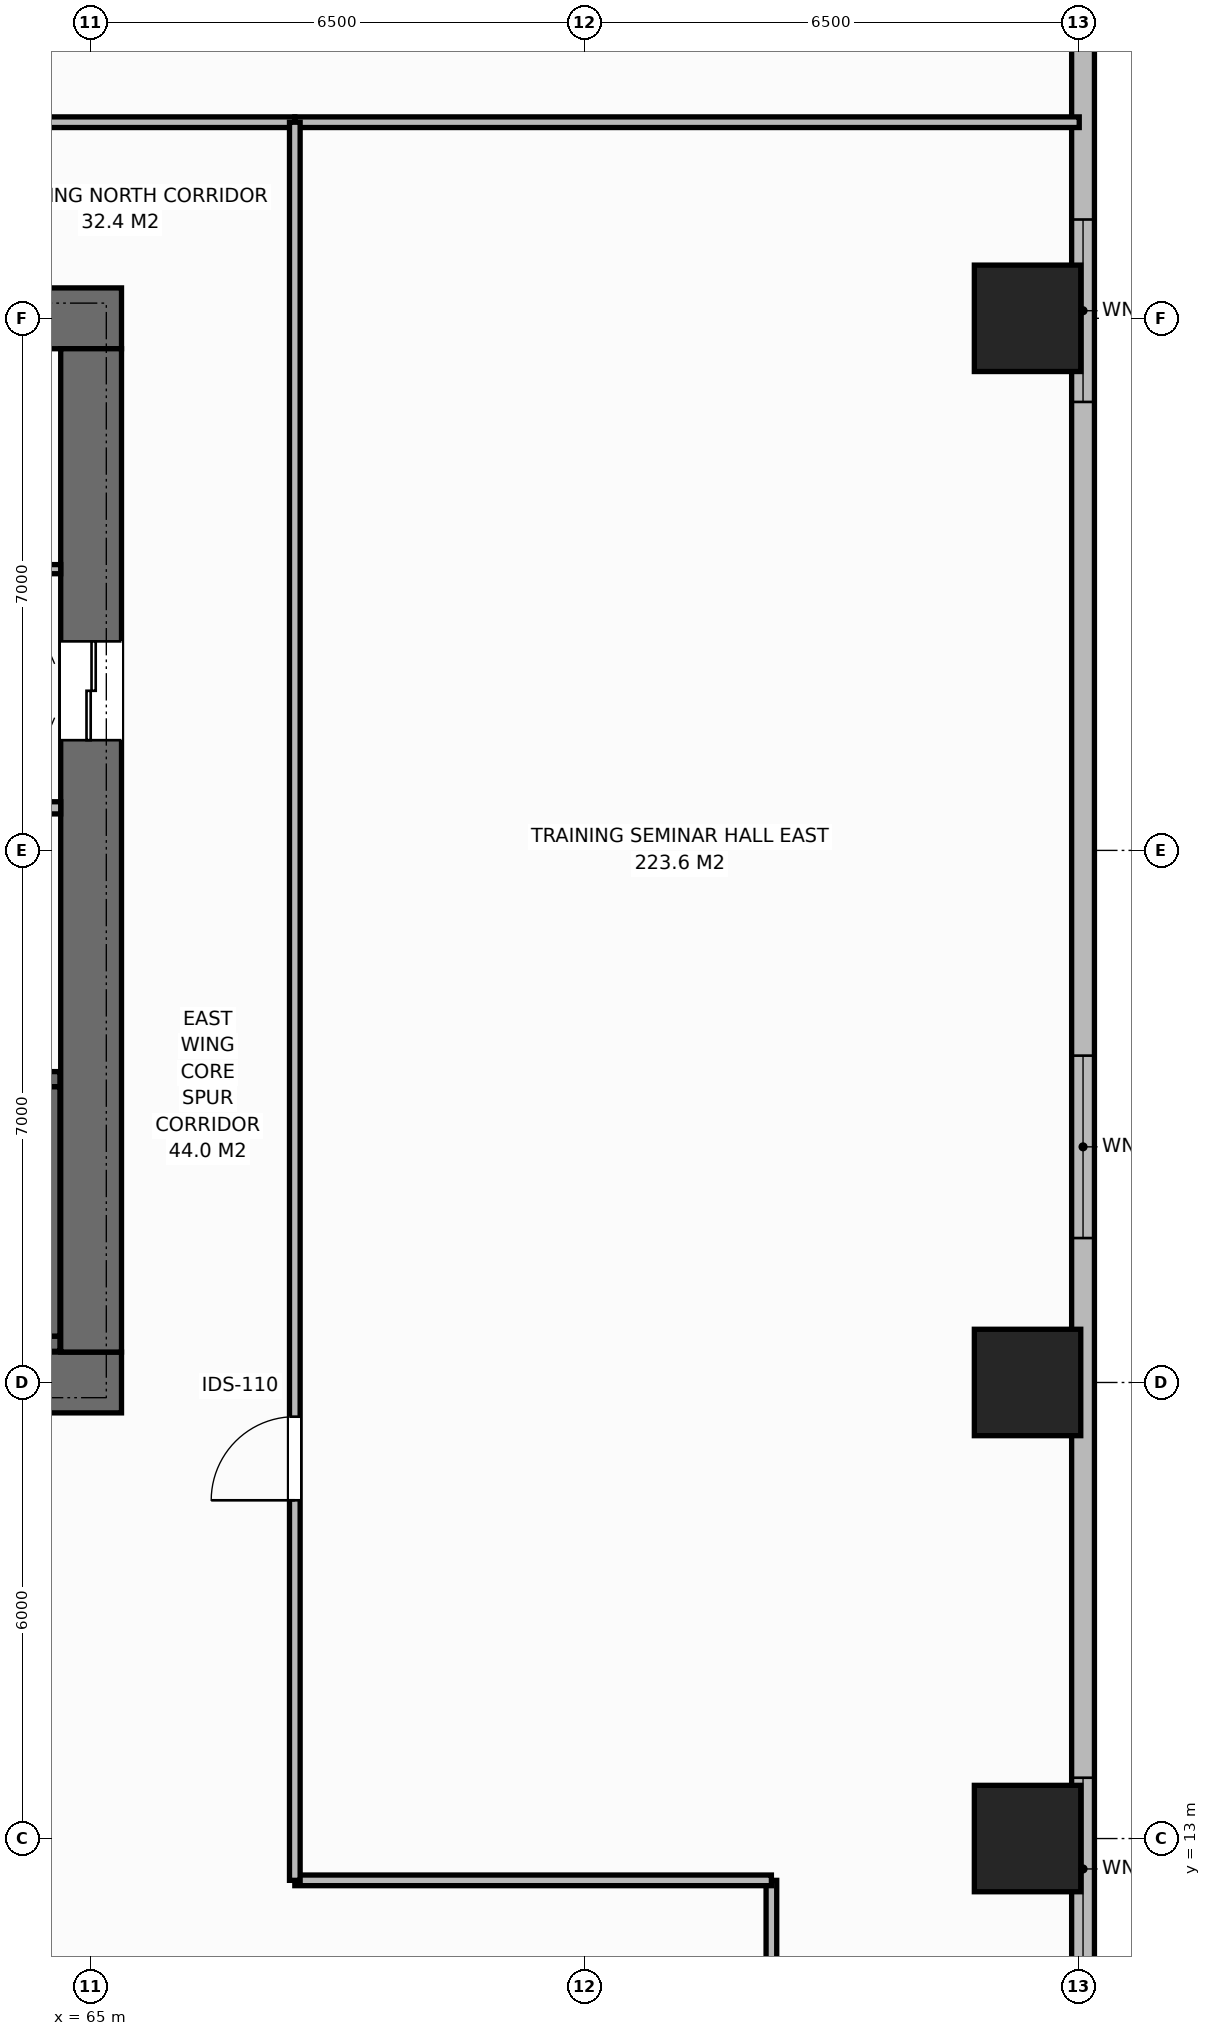
"""IFC4 building model, lengths in metres.
Left out: names, types, materials, properties, quantities, classifications, styles, units other than length and angle.
Written with IfcOpenShell. Run it as: python <this file> out.ifc"""

import sys

from ifc_helpers import new_model, si_unit, direction, frame, frame_2d, origin, origin_2d, place, context, subcontext, project, spatial, rectangle, extrude, element, fill, save


model = new_model("IFC4")
c1 = context("Model", 3, precision=1e-05, world=origin(), true_north=direction((0.0, 1.0)))
c2 = subcontext(c1, "Body", "Model", "MODEL_VIEW")
j1 = project(units=[si_unit("LENGTHUNIT", "METRE"), si_unit("PLANEANGLEUNIT", "RADIAN")], contexts=[c1])
p1 = place(None, origin())
s1 = spatial("IfcSite", under=j1, at=p1, CompositionType="ELEMENT")
p2 = place(p1, origin())
s2 = spatial("IfcBuilding", under=s1, at=p2, CompositionType="ELEMENT")
p3 = place(p2, frame((0.0, 0.0, 11.5)))
s3 = spatial("IfcBuildingStorey", under=s2, at=p3, CompositionType="ELEMENT", Elevation=11.5)
p4 = place(p3, frame((51.6, 19.0, 0.0), z_axis=(0.0, 0.0, 1.0), x_axis=(1.0, 0.0, 0.0)))
e1 = element("IfcWall", 1, at=p4, inside=s3, PredefinedType="SHEAR", context=c2, shape_type="SweptSolid", body=[
    extrude(rectangle(XDim=13.8, YDim=0.8, at=frame_2d((6.9, 0.0))), origin(), (0.0, 0.0, 1.0), 5.5),
])
p5 = place(p4, frame((3.12, 0.0, 0.0)))
e2 = element("IfcOpeningElement", 2, at=p5, cuts=e1, PredefinedType="OPENING", context=c2, shape_type="SweptSolid", body=[
    extrude(rectangle(XDim=1.4, YDim=2.2, at=frame_2d((0.7, 1.1))), frame((0.0, 0.41, 0.0), z_axis=(0.0, -1.0, 0.0), x_axis=(1.0, 0.0, 0.0)), (0.0, 0.0, 1.0), 0.82),
])
p6 = place(p3, frame((51.6, 33.0, 0.0), z_axis=(0.0, 0.0, 1.0), x_axis=(1.0, 0.0, 0.0)))
e3 = element("IfcWall", 3, at=p6, inside=s3, PredefinedType="SHEAR", context=c2, shape_type="SweptSolid", body=[
    extrude(rectangle(XDim=13.8, YDim=0.8, at=frame_2d((6.9, 0.0))), origin(), (0.0, 0.0, 1.0), 5.5),
])
p7 = place(p6, frame((3.12, 0.0, 0.0)))
e4 = element("IfcOpeningElement", 4, at=p7, cuts=e3, PredefinedType="OPENING", context=c2, shape_type="SweptSolid", body=[
    extrude(rectangle(XDim=1.4, YDim=2.2, at=frame_2d((0.7, 1.1))), frame((0.0, 0.41, 0.0), z_axis=(0.0, -1.0, 0.0), x_axis=(1.0, 0.0, 0.0)), (0.0, 0.0, 1.0), 0.82),
])
p8 = place(p6, frame((11.0, 0.0, 0.0)))
e5 = element("IfcOpeningElement", 5, at=p8, cuts=e3, PredefinedType="OPENING", context=c2, shape_type="SweptSolid", body=[
    extrude(rectangle(XDim=0.9, YDim=2.15, at=frame_2d((0.45, 1.075))), frame((0.0, 0.41, 0.0), z_axis=(0.0, -1.0, 0.0), x_axis=(1.0, 0.0, 0.0)), (0.0, 0.0, 1.0), 0.82),
])
p9 = place(p6, frame((5.75, 0.0, 0.0)))
e6 = element("IfcOpeningElement", 6, at=p9, cuts=e3, PredefinedType="OPENING", context=c2, shape_type="SweptSolid", body=[
    extrude(rectangle(XDim=0.9, YDim=2.15, at=frame_2d((0.45, 1.075))), frame((0.0, 0.41, 0.0), z_axis=(0.0, -1.0, 0.0), x_axis=(1.0, 0.0, 0.0)), (0.0, 0.0, 1.0), 0.82),
])
p10 = place(p6, frame((7.35, 0.0, 0.0)))
e7 = element("IfcOpeningElement", 7, at=p10, cuts=e3, PredefinedType="OPENING", context=c2, shape_type="SweptSolid", body=[
    extrude(rectangle(XDim=0.9, YDim=2.15, at=frame_2d((0.45, 1.075))), frame((0.0, 0.41, 0.0), z_axis=(0.0, -1.0, 0.0), x_axis=(1.0, 0.0, 0.0)), (0.0, 0.0, 1.0), 0.82),
])
p11 = place(p6, frame((8.95, 0.0, 0.0)))
e8 = element("IfcOpeningElement", 8, at=p11, cuts=e3, PredefinedType="OPENING", context=c2, shape_type="SweptSolid", body=[
    extrude(rectangle(XDim=0.9, YDim=2.15, at=frame_2d((0.45, 1.075))), frame((0.0, 0.41, 0.0), z_axis=(0.0, -1.0, 0.0), x_axis=(1.0, 0.0, 0.0)), (0.0, 0.0, 1.0), 0.82),
])
p12 = place(p3, frame((65.0, 19.4, 0.0), z_axis=(0.0, 0.0, 1.0), x_axis=(0.0, 1.0, 0.0)))
e9 = element("IfcWall", 9, at=p12, inside=s3, PredefinedType="SHEAR", context=c2, shape_type="SweptSolid", body=[
    extrude(rectangle(XDim=13.2, YDim=0.8, at=frame_2d((6.6, 0.0))), origin(), (0.0, 0.0, 1.0), 5.5),
])
p13 = place(p12, frame((8.05, 0.0, 0.0)))
e10 = element("IfcOpeningElement", 10, at=p13, cuts=e9, PredefinedType="OPENING", context=c2, shape_type="SweptSolid", body=[
    extrude(rectangle(XDim=1.3, YDim=2.2, at=frame_2d((0.65, 1.1))), frame((0.0, 0.41, 0.0), z_axis=(0.0, -1.0, 0.0), x_axis=(1.0, 0.0, 0.0)), (0.0, 0.0, 1.0), 0.82),
])
p14 = place(p3, frame((56.16, 19.51, 0.0), z_axis=(0.0, 0.0, 1.0), x_axis=(1.0, 0.0, 0.0)))
e11 = element("IfcWall", 11, at=p14, inside=s3, PredefinedType="SHEAR", context=c2, shape_type="SweptSolid", body=[
    extrude(rectangle(XDim=8.43, YDim=0.2, at=frame_2d((4.215, 0.0))), origin(), (0.0, 0.0, 1.0), 5.5),
])
p15 = place(p3, frame((56.16, 22.99, 0.0), z_axis=(0.0, 0.0, 1.0), x_axis=(1.0, 0.0, 0.0)))
e12 = element("IfcWall", 12, at=p15, inside=s3, PredefinedType="SHEAR", context=c2, shape_type="SweptSolid", body=[
    extrude(rectangle(XDim=8.43, YDim=0.2, at=frame_2d((4.215, 0.0))), origin(), (0.0, 0.0, 1.0), 5.5),
])
p16 = place(p15, frame((0.45, 0.0, 0.0)))
e13 = element("IfcOpeningElement", 13, at=p16, cuts=e12, PredefinedType="OPENING", context=c2, shape_type="SweptSolid", body=[
    extrude(rectangle(XDim=1.0, YDim=2.15, at=frame_2d((0.5, 1.075))), frame((0.0, 0.11, 0.0), z_axis=(0.0, -1.0, 0.0), x_axis=(1.0, 0.0, 0.0)), (0.0, 0.0, 1.0), 0.22),
])
p17 = place(p3, frame((64.49, 19.61, 0.0), z_axis=(0.0, 0.0, 1.0), x_axis=(0.0, 1.0, 0.0)))
e14 = element("IfcWall", 14, at=p17, inside=s3, PredefinedType="SHEAR", context=c2, shape_type="SweptSolid", body=[
    extrude(rectangle(XDim=3.28, YDim=0.2, at=frame_2d((1.64, 0.0))), origin(), (0.0, 0.0, 1.0), 5.5),
])
for number, where, z_axis, x_axis in (
    (15, (77.32, 13.0, 0.0), (0.0, 0.0, 1.0), (1.0, 0.0, 0.0)),
    (16, (77.32, 19.0, 0.0), (0.0, 0.0, 1.0), (1.0, 0.0, 0.0)),
    (17, (77.32, 33.0, 0.0), (0.0, 0.0, 1.0), (1.0, 0.0, 0.0)),
):
    element("IfcColumn", number, at=place(p3, frame(where, z_axis=z_axis, x_axis=x_axis)), inside=s3, PredefinedType="COLUMN", context=c2, shape_type="SweptSolid", body=[
        extrude(rectangle(XDim=1.4, YDim=1.4, at=origin_2d()), origin(), (0.0, 0.0, 1.0), 5.5),
    ])
p18 = place(p3, frame((78.05, 48.8, 0.0), z_axis=(0.0, 0.0, 1.0), x_axis=(0.0, -1.0, 0.0)))
e18 = element("IfcWall", 18, at=p18, inside=s3, PredefinedType="STANDARD", context=c2, shape_type="SweptSolid", body=[
    extrude(rectangle(XDim=45.6, YDim=0.3, at=frame_2d((22.8, 0.0))), origin(), (0.0, 0.0, 1.0), 5.22),
])
p19 = place(p18, frame((5.0, 0.0, 0.9)))
e19 = element("IfcOpeningElement", 19, at=p19, cuts=e18, PredefinedType="OPENING", context=c2, shape_type="SweptSolid", body=[
    extrude(rectangle(XDim=2.4, YDim=2.2, at=frame_2d((1.2, 1.1))), frame((0.0, 0.16, 0.0), z_axis=(0.0, -1.0, 0.0), x_axis=(1.0, 0.0, 0.0)), (0.0, 0.0, 1.0), 0.32),
])
p20 = place(p18, frame((14.5, 0.0, 0.9)))
e20 = element("IfcOpeningElement", 20, at=p20, cuts=e18, PredefinedType="OPENING", context=c2, shape_type="SweptSolid", body=[
    extrude(rectangle(XDim=2.4, YDim=2.2, at=frame_2d((1.2, 1.1))), frame((0.0, 0.16, 0.0), z_axis=(0.0, -1.0, 0.0), x_axis=(1.0, 0.0, 0.0)), (0.0, 0.0, 1.0), 0.32),
])
p21 = place(p18, frame((25.5, 0.0, 0.9)))
e21 = element("IfcOpeningElement", 21, at=p21, cuts=e18, PredefinedType="OPENING", context=c2, shape_type="SweptSolid", body=[
    extrude(rectangle(XDim=2.4, YDim=2.2, at=frame_2d((1.2, 1.1))), frame((0.0, 0.16, 0.0), z_axis=(0.0, -1.0, 0.0), x_axis=(1.0, 0.0, 0.0)), (0.0, 0.0, 1.0), 0.32),
])
p22 = place(p18, frame((35.0, 0.0, 0.9)))
e22 = element("IfcOpeningElement", 22, at=p22, cuts=e18, PredefinedType="OPENING", context=c2, shape_type="SweptSolid", body=[
    extrude(rectangle(XDim=2.4, YDim=2.2, at=frame_2d((1.2, 1.1))), frame((0.0, 0.16, 0.0), z_axis=(0.0, -1.0, 0.0), x_axis=(1.0, 0.0, 0.0)), (0.0, 0.0, 1.0), 0.32),
])
p23 = place(p3, frame((56.26, 26.56, 0.0), z_axis=(0.0, 0.0, 1.0), x_axis=(1.0, 0.0, 0.0)))
e23 = element("IfcWall", 23, at=p23, inside=s3, PredefinedType="STANDARD", context=c2, shape_type="SweptSolid", body=[
    extrude(rectangle(XDim=8.34, YDim=0.16, at=frame_2d((4.17, 0.0))), origin(), (0.0, 0.0, 1.0), 5.22),
])
p24 = place(p3, frame((61.87, 29.7, 0.0), z_axis=(0.0, 0.0, 1.0), x_axis=(1.0, 0.0, 0.0)))
e24 = element("IfcWall", 24, at=p24, inside=s3, PredefinedType="PARTITIONING", context=c2, shape_type="SweptSolid", body=[
    extrude(rectangle(XDim=2.73, YDim=0.12, at=frame_2d((1.365, 0.0))), origin(), (0.0, 0.0, 1.0), 5.22),
])
p25 = place(p3, frame((73.95, 10.19, 0.0), z_axis=(0.0, 0.0, 1.0), x_axis=(0.0, 1.0, 0.0)))
e25 = element("IfcWall", 25, at=p25, inside=s3, PredefinedType="PARTITIONING", context=c2, shape_type="SweptSolid", body=[
    extrude(rectangle(XDim=2.26, YDim=0.14, at=frame_2d((1.13, 0.0))), origin(), (0.0, 0.0, 1.0), 5.22),
])
p26 = place(p3, frame((67.68, 12.45, 0.0), z_axis=(0.0, 0.0, 1.0), x_axis=(1.0, 0.0, 0.0)))
e26 = element("IfcWall", 26, at=p26, inside=s3, PredefinedType="PARTITIONING", context=c2, shape_type="SweptSolid", body=[
    extrude(rectangle(XDim=6.27, YDim=0.14, at=frame_2d((3.135, 0.0))), origin(), (0.0, 0.0, 1.0), 5.22),
])
p27 = place(p3, frame((67.68, 35.58, 0.0), z_axis=(0.0, 0.0, 1.0), x_axis=(1.0, 0.0, 0.0)))
e27 = element("IfcWall", 27, at=p27, inside=s3, PredefinedType="PARTITIONING", context=c2, shape_type="SweptSolid", body=[
    extrude(rectangle(XDim=10.32, YDim=0.14, at=frame_2d((5.16, 0.0))), origin(), (0.0, 0.0, 1.0), 5.22),
])
p28 = place(p3, frame((52.08, 35.58, 0.0), z_axis=(0.0, 0.0, 1.0), x_axis=(1.0, 0.0, 0.0)))
e28 = element("IfcWall", 28, at=p28, inside=s3, PredefinedType="PARTITIONING", context=c2, shape_type="SweptSolid", body=[
    extrude(rectangle(XDim=15.6, YDim=0.14, at=frame_2d((7.8, 0.0))), origin(), (0.0, 0.0, 1.0), 5.22),
])
p29 = place(p28, frame((3.0, 0.0, 0.0)))
e29 = element("IfcOpeningElement", 29, at=p29, cuts=e28, PredefinedType="OPENING", context=c2, shape_type="SweptSolid", body=[
    extrude(rectangle(XDim=1.1, YDim=2.15, at=frame_2d((0.55, 1.075))), frame((0.0, 0.08, 0.0), z_axis=(0.0, -1.0, 0.0), x_axis=(1.0, 0.0, 0.0)), (0.0, 0.0, 1.0), 0.16),
])
p30 = place(p3, frame((67.68, 12.45, 0.0), z_axis=(0.0, 0.0, 1.0), x_axis=(0.0, 1.0, 0.0)))
e30 = element("IfcWall", 30, at=p30, inside=s3, PredefinedType="PARTITIONING", context=c2, shape_type="SweptSolid", body=[
    extrude(rectangle(XDim=23.13, YDim=0.14, at=frame_2d((11.565, 0.0))), origin(), (0.0, 0.0, 1.0), 5.22),
])
p31 = place(p30, frame((5.0, 0.0, 0.0)))
e31 = element("IfcOpeningElement", 31, at=p31, cuts=e30, PredefinedType="OPENING", context=c2, shape_type="SweptSolid", body=[
    extrude(rectangle(XDim=1.1, YDim=2.15, at=frame_2d((0.55, 1.075))), frame((0.0, 0.08, 0.0), z_axis=(0.0, -1.0, 0.0), x_axis=(1.0, 0.0, 0.0)), (0.0, 0.0, 1.0), 0.16),
])
p32 = place(p20, origin())
e32 = element("IfcWindow", 32, at=p32, inside=s3, PartitioningType="SINGLE_PANEL", PredefinedType="WINDOW", context=c2, shape_type="SweptSolid", body=[
    extrude(rectangle(XDim=2.4, YDim=2.2, at=frame_2d((1.2, 1.1))), frame((0.0, 0.03, 0.0), z_axis=(0.0, -1.0, 0.0), x_axis=(1.0, 0.0, 0.0)), (0.0, 0.0, 1.0), 0.06),
])
fill(e20, e32)
p33 = place(p21, origin())
e33 = element("IfcWindow", 33, at=p33, inside=s3, PartitioningType="SINGLE_PANEL", PredefinedType="WINDOW", context=c2, shape_type="SweptSolid", body=[
    extrude(rectangle(XDim=2.4, YDim=2.2, at=frame_2d((1.2, 1.1))), frame((0.0, 0.03, 0.0), z_axis=(0.0, -1.0, 0.0), x_axis=(1.0, 0.0, 0.0)), (0.0, 0.0, 1.0), 0.06),
])
fill(e21, e33)
p34 = place(p22, origin())
e34 = element("IfcWindow", 34, at=p34, inside=s3, PartitioningType="SINGLE_PANEL", PredefinedType="WINDOW", context=c2, shape_type="SweptSolid", body=[
    extrude(rectangle(XDim=2.4, YDim=2.2, at=frame_2d((1.2, 1.1))), frame((0.0, 0.03, 0.0), z_axis=(0.0, -1.0, 0.0), x_axis=(1.0, 0.0, 0.0)), (0.0, 0.0, 1.0), 0.06),
])
fill(e22, e34)
p35 = place(p13, origin())
e35 = element("IfcDoor", 35, at=p35, inside=s3, OperationType="DOUBLE_DOOR_SLIDING", PredefinedType="DOOR", context=c2, shape_type="SweptSolid", body=[
    extrude(rectangle(XDim=1.3, YDim=2.2, at=frame_2d((0.65, 1.1))), frame((0.0, 0.025, 0.0), z_axis=(0.0, -1.0, 0.0), x_axis=(1.0, 0.0, 0.0)), (0.0, 0.0, 1.0), 0.05),
])
fill(e10, e35)
p36 = place(p31, origin())
e36 = element("IfcDoor", 36, at=p36, inside=s3, OperationType="SINGLE_SWING_LEFT", PredefinedType="DOOR", context=c2, shape_type="SweptSolid", body=[
    extrude(rectangle(XDim=1.1, YDim=2.15, at=frame_2d((0.55, 1.075))), frame((0.0, 0.025, 0.0), z_axis=(0.0, -1.0, 0.0), x_axis=(1.0, 0.0, 0.0)), (0.0, 0.0, 1.0), 0.05),
])
fill(e31, e36)
save(model, sys.argv[1])
